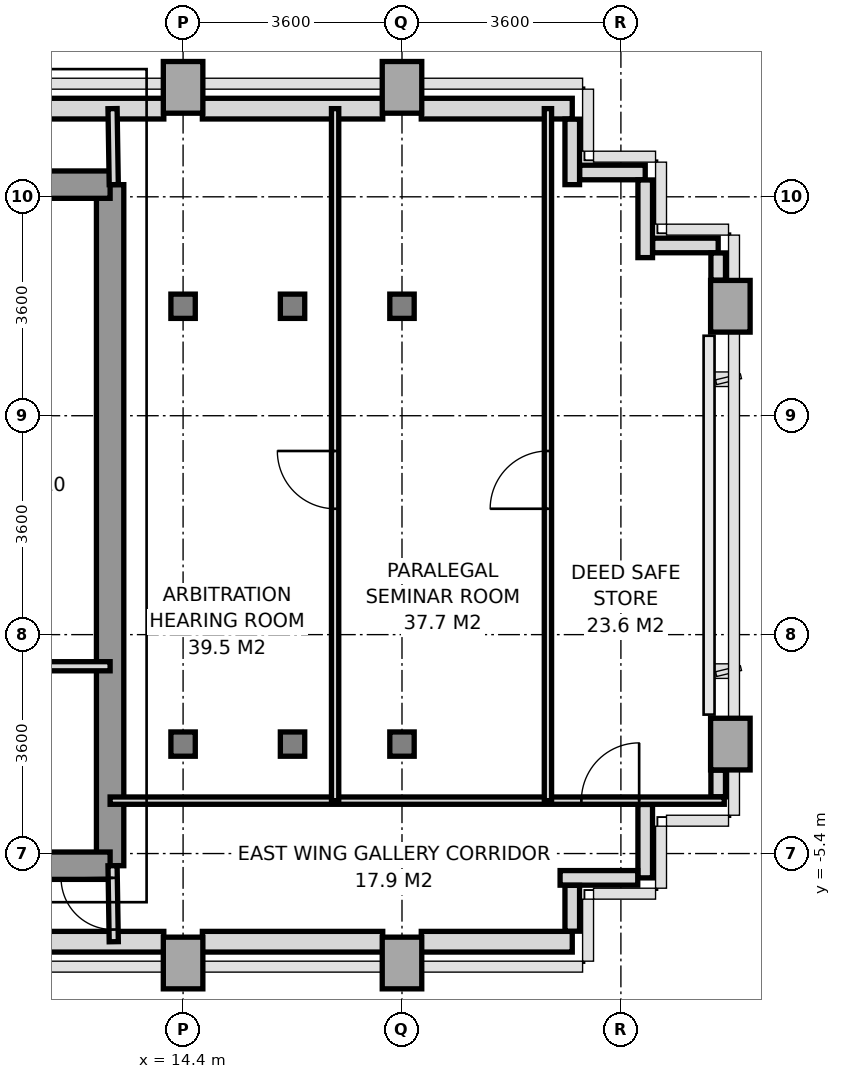
"""IFC4 building model, lengths in metres.
Left out: names, types, materials, properties, quantities, classifications, styles, units other than length and angle.
Written with IfcOpenShell. Run it as: python <this file> out.ifc"""

import sys

from ifc_helpers import new_model, si_unit, direction, frame, frame_2d, origin, origin_2d, place, context, subcontext, project, spatial, rectangle, i_section, extrude, source, transform, mapped, element, fill, save


model = new_model("IFC4")
c1 = context("Model", 3, precision=1e-05, world=origin(), true_north=direction((0.0, 1.0)))
c2 = subcontext(c1, "Body", "Model", "MODEL_VIEW")
j1 = project(units=[si_unit("LENGTHUNIT", "METRE"), si_unit("PLANEANGLEUNIT", "RADIAN")], contexts=[c1])
p1 = place(None, origin())
s1 = spatial("IfcSite", under=j1, at=p1, CompositionType="ELEMENT")
p2 = place(p1, origin())
s2 = spatial("IfcBuilding", under=s1, at=p2, CompositionType="ELEMENT")
p3 = place(p2, frame((0.0, 0.0, 127.8)))
s3 = spatial("IfcBuildingStorey", under=s2, at=p3, CompositionType="ELEMENT", Elevation=127.8)
m1 = source(origin(), c2, "Body", "SweptSolid", [
    extrude(rectangle(XDim=0.65, YDim=0.85, at=origin_2d()), origin(), (0.0, 0.0, 1.0), 3.2),
])
p4 = place(p3, frame((14.4, -7.2, 0.0), z_axis=(0.0, 0.0, 1.0), x_axis=(1.0, 0.0, 0.0)))
e1 = element("IfcColumn", 1, at=p4, inside=s3, PredefinedType="COLUMN", context=c2, shape_type="MappedRepresentation", body=[
    mapped(m1, transform((0.0, 0.0, 0.0), x_axis=(1.0, 0.0, 0.0), y_axis=(0.0, 1.0, 0.0), z_axis=(0.0, 0.0, 1.0), scale=1.0)),
])
m2 = source(origin(), c2, "Body", "SweptSolid", [
    extrude(i_section(OverallWidth=0.401, OverallDepth=0.399, WebThickness=0.02, FlangeThickness=0.032, at=origin_2d()), origin(), (0.0, 0.0, 1.0), 3.2),
])
for number, where, z_axis, x_axis in (
    (2, (14.4, -3.6, 0.0), (0.0, 0.0, 1.0), (1.0, 0.0, 0.0)),
    (3, (14.4, 3.6, 0.0), (0.0, 0.0, 1.0), (1.0, 0.0, 0.0)),
):
    element("IfcColumn", number, at=place(p3, frame(where, z_axis=z_axis, x_axis=x_axis)), inside=s3, PredefinedType="COLUMN", context=c2, shape_type="MappedRepresentation", body=[
        mapped(m2, transform((0.0, 0.0, 0.0), x_axis=(1.0, 0.0, 0.0), y_axis=(0.0, 1.0, 0.0), z_axis=(0.0, 0.0, 1.0), scale=1.0)),
    ])
p5 = place(p3, frame((14.4, 7.2, 0.0), z_axis=(0.0, 0.0, 1.0), x_axis=(1.0, 0.0, 0.0)))
e4 = element("IfcColumn", 4, at=p5, inside=s3, PredefinedType="COLUMN", context=c2, shape_type="MappedRepresentation", body=[
    mapped(m1, transform((0.0, 0.0, 0.0), x_axis=(1.0, 0.0, 0.0), y_axis=(0.0, 1.0, 0.0), z_axis=(0.0, 0.0, 1.0), scale=1.0)),
])
for number, where, z_axis, x_axis in (
    (5, (16.2, -3.6, 0.0), (0.0, 0.0, 1.0), (1.0, 0.0, 0.0)),
    (6, (16.2, 3.6, 0.0), (0.0, 0.0, 1.0), (1.0, 0.0, 0.0)),
):
    element("IfcColumn", number, at=place(p3, frame(where, z_axis=z_axis, x_axis=x_axis)), inside=s3, PredefinedType="COLUMN", context=c2, shape_type="MappedRepresentation", body=[
        mapped(m2, transform((0.0, 0.0, 0.0), x_axis=(1.0, 0.0, 0.0), y_axis=(0.0, 1.0, 0.0), z_axis=(0.0, 0.0, 1.0), scale=1.0)),
    ])
p6 = place(p3, frame((18.0, -7.2, 0.0), z_axis=(0.0, 0.0, 1.0), x_axis=(1.0, 0.0, 0.0)))
e7 = element("IfcColumn", 7, at=p6, inside=s3, PredefinedType="COLUMN", context=c2, shape_type="MappedRepresentation", body=[
    mapped(m1, transform((0.0, 0.0, 0.0), x_axis=(1.0, 0.0, 0.0), y_axis=(0.0, 1.0, 0.0), z_axis=(0.0, 0.0, 1.0), scale=1.0)),
])
for number, where, z_axis, x_axis in (
    (8, (18.0, -3.6, 0.0), (0.0, 0.0, 1.0), (1.0, 0.0, 0.0)),
    (9, (18.0, 3.6, 0.0), (0.0, 0.0, 1.0), (1.0, 0.0, 0.0)),
):
    element("IfcColumn", number, at=place(p3, frame(where, z_axis=z_axis, x_axis=x_axis)), inside=s3, PredefinedType="COLUMN", context=c2, shape_type="MappedRepresentation", body=[
        mapped(m2, transform((0.0, 0.0, 0.0), x_axis=(1.0, 0.0, 0.0), y_axis=(0.0, 1.0, 0.0), z_axis=(0.0, 0.0, 1.0), scale=1.0)),
    ])
for number, where, z_axis, x_axis in (
    (10, (18.0, 7.2, 0.0), (0.0, 0.0, 1.0), (1.0, 0.0, 0.0)),
    (11, (23.4, -3.6, 0.0), (0.0, 0.0, 1.0), (1.0, 0.0, 0.0)),
    (12, (23.4, 3.6, 0.0), (0.0, 0.0, 1.0), (1.0, 0.0, 0.0)),
):
    element("IfcColumn", number, at=place(p3, frame(where, z_axis=z_axis, x_axis=x_axis)), inside=s3, PredefinedType="COLUMN", context=c2, shape_type="MappedRepresentation", body=[
        mapped(m1, transform((0.0, 0.0, 0.0), x_axis=(1.0, 0.0, 0.0), y_axis=(0.0, 1.0, 0.0), z_axis=(0.0, 0.0, 1.0), scale=1.0)),
    ])
p7 = place(p3, frame((11.498, 6.85, 0.0), z_axis=(0.0, 0.0, 1.0), x_axis=(1.0, 0.0, 0.0)))
e13 = element("IfcWall", 13, at=p7, inside=s3, PredefinedType="SOLIDWALL", context=c2, shape_type="SweptSolid", body=[
    extrude(rectangle(XDim=2.585, YDim=0.34, at=frame_2d((1.292, 0.0))), origin(), (0.0, 0.0, 1.0), 3.2),
])
p8 = place(p3, frame((14.717, 6.85, 0.0), z_axis=(0.0, 0.0, 1.0), x_axis=(1.0, 0.0, 0.0)))
e14 = element("IfcWall", 14, at=p8, inside=s3, PredefinedType="SOLIDWALL", context=c2, shape_type="SweptSolid", body=[
    extrude(rectangle(XDim=2.966, YDim=0.34, at=frame_2d((1.483, 0.0))), origin(), (0.0, 0.0, 1.0), 2.45),
])
p9 = place(p3, frame((18.317, 6.85, 0.0), z_axis=(0.0, 0.0, 1.0), x_axis=(1.0, 0.0, 0.0)))
e15 = element("IfcWall", 15, at=p9, inside=s3, PredefinedType="SOLIDWALL", context=c2, shape_type="SweptSolid", body=[
    extrude(rectangle(XDim=2.483, YDim=0.34, at=frame_2d((1.242, 0.0))), origin(), (0.0, 0.0, 1.0), 3.2),
])
p10 = place(p3, frame((11.75, -6.85, 0.0), z_axis=(0.0, 0.0, 1.0), x_axis=(1.0, 0.0, 0.0)))
e16 = element("IfcWall", 16, at=p10, inside=s3, PredefinedType="SOLIDWALL", context=c2, shape_type="SweptSolid", body=[
    extrude(rectangle(XDim=2.333, YDim=0.34, at=frame_2d((1.167, 0.0))), origin(), (0.0, 0.0, 1.0), 3.2),
])
p11 = place(p3, frame((14.717, -6.85, 0.0), z_axis=(0.0, 0.0, 1.0), x_axis=(1.0, 0.0, 0.0)))
e17 = element("IfcWall", 17, at=p11, inside=s3, PredefinedType="SOLIDWALL", context=c2, shape_type="SweptSolid", body=[
    extrude(rectangle(XDim=2.966, YDim=0.34, at=frame_2d((1.483, 0.0))), origin(), (0.0, 0.0, 1.0), 2.45),
])
p12 = place(p3, frame((18.317, -6.85, 0.0), z_axis=(0.0, 0.0, 1.0), x_axis=(1.0, 0.0, 0.0)))
e18 = element("IfcWall", 18, at=p12, inside=s3, PredefinedType="SOLIDWALL", context=c2, shape_type="SweptSolid", body=[
    extrude(rectangle(XDim=2.483, YDim=0.34, at=frame_2d((1.242, 0.0))), origin(), (0.0, 0.0, 1.0), 3.2),
])
p13 = place(p3, frame((22.0, -4.593, 0.0), z_axis=(0.0, 0.0, 1.0), x_axis=(0.0, -1.0, 0.0)))
e19 = element("IfcWall", 19, at=p13, inside=s3, PredefinedType="PARAPET", context=c2, shape_type="SweptSolid", body=[
    extrude(rectangle(XDim=1.207, YDim=0.24, at=frame_2d((0.604, 0.0))), origin(), (0.0, 0.0, 1.0), 1.15),
])
p14 = place(p3, frame((21.877, -5.8, 0.0), z_axis=(0.0, 0.0, 1.0), x_axis=(-1.0, 0.0, 0.0)))
e20 = element("IfcWall", 20, at=p14, inside=s3, PredefinedType="PARAPET", context=c2, shape_type="SweptSolid", body=[
    extrude(rectangle(XDim=1.277, YDim=0.24, at=frame_2d((0.638, 0.0))), origin(), (0.0, 0.0, 1.0), 1.15),
])
p15 = place(p3, frame((20.8, -5.923, 0.0), z_axis=(0.0, 0.0, 1.0), x_axis=(0.0, -1.0, 0.0)))
e21 = element("IfcWall", 21, at=p15, inside=s3, PredefinedType="PARAPET", context=c2, shape_type="SweptSolid", body=[
    extrude(rectangle(XDim=0.754, YDim=0.24, at=frame_2d((0.377, 0.0))), origin(), (0.0, 0.0, 1.0), 1.15),
])
for number, where, z_axis, x_axis in (
    (22, (20.8, 6.677, 0.0), (0.0, 0.0, 1.0), (0.0, -1.0, 0.0)),
    (23, (20.923, 5.8, 0.0), (0.0, 0.0, 1.0), (1.0, 0.0, 0.0)),
):
    element("IfcWall", number, at=place(p3, frame(where, z_axis=z_axis, x_axis=x_axis)), inside=s3, PredefinedType="PARAPET", context=c2, shape_type="SweptSolid", body=[
        extrude(rectangle(XDim=1.077, YDim=0.24, at=frame_2d((0.539, 0.0))), origin(), (0.0, 0.0, 1.0), 1.15),
    ])
p16 = place(p3, frame((22.0, 5.677, 0.0), z_axis=(0.0, 0.0, 1.0), x_axis=(0.0, -1.0, 0.0)))
e24 = element("IfcWall", 24, at=p16, inside=s3, PredefinedType="PARAPET", context=c2, shape_type="SweptSolid", body=[
    extrude(rectangle(XDim=1.277, YDim=0.24, at=frame_2d((0.639, 0.0))), origin(), (0.0, 0.0, 1.0), 1.15),
])
p17 = place(p3, frame((22.123, 4.6, 0.0), z_axis=(0.0, 0.0, 1.0), x_axis=(1.0, 0.0, 0.0)))
e25 = element("IfcWall", 25, at=p17, inside=s3, PredefinedType="PARAPET", context=c2, shape_type="SweptSolid", body=[
    extrude(rectangle(XDim=1.077, YDim=0.24, at=frame_2d((0.539, 0.0))), origin(), (0.0, 0.0, 1.0), 1.15),
])
p18 = place(p3, frame((23.2, 4.477, 0.0), z_axis=(0.0, 0.0, 1.0), x_axis=(0.0, -1.0, 0.0)))
e26 = element("IfcWall", 26, at=p18, inside=s3, PredefinedType="PARAPET", context=c2, shape_type="SweptSolid", body=[
    extrude(rectangle(XDim=0.449, YDim=0.24, at=frame_2d((0.225, 0.0))), origin(), (0.0, 0.0, 1.0), 1.15),
])
p19 = place(p3, frame((23.2, -4.028, 0.0), z_axis=(0.0, 0.0, 1.0), x_axis=(0.0, -1.0, 0.0)))
e27 = element("IfcWall", 27, at=p19, inside=s3, PredefinedType="PARAPET", context=c2, shape_type="SweptSolid", body=[
    extrude(rectangle(XDim=0.439, YDim=0.24, at=frame_2d((0.219, 0.0))), origin(), (0.0, 0.0, 1.0), 1.15),
])
p20 = place(p3, frame((13.2, -5.6, 0.0), z_axis=(0.0, 0.0, 1.0), x_axis=(0.0, 1.0, 0.0)))
e28 = element("IfcWall", 28, at=p20, inside=s3, PredefinedType="SHEAR", context=c2, shape_type="SweptSolid", body=[
    extrude(rectangle(XDim=11.2, YDim=0.45, at=frame_2d((5.6, 0.0))), origin(), (0.0, 0.0, 1.0), 3.2),
])
p21 = place(p3, frame((11.381, 5.6, 0.0), z_axis=(0.0, 0.0, 1.0), x_axis=(1.0, 0.0, 0.0)))
e29 = element("IfcWall", 29, at=p21, inside=s3, PredefinedType="SHEAR", context=c2, shape_type="SweptSolid", body=[
    extrude(rectangle(XDim=1.819, YDim=0.45, at=frame_2d((0.909, 0.0))), origin(), (0.0, 0.0, 1.0), 3.2),
])
p22 = place(p3, frame((5.4, -5.6, 0.0), z_axis=(0.0, 0.0, 1.0), x_axis=(1.0, 0.0, 0.0)))
e30 = element("IfcWall", 30, at=p22, inside=s3, PredefinedType="SHEAR", context=c2, shape_type="SweptSolid", body=[
    extrude(rectangle(XDim=7.8, YDim=0.45, at=frame_2d((3.9, 0.0))), origin(), (0.0, 0.0, 1.0), 3.2),
])
p23 = place(p22, frame((3.0, 0.0, 0.0)))
e31 = element("IfcOpeningElement", 31, at=p23, cuts=e30, PredefinedType="OPENING", context=c2, shape_type="SweptSolid", body=[
    extrude(rectangle(XDim=1.2, YDim=2.2, at=frame_2d((0.6, 1.1))), frame((0.0, 0.235, 0.0), z_axis=(0.0, -1.0, 0.0), x_axis=(1.0, 0.0, 0.0)), (0.0, 0.0, 1.0), 0.47),
])
p24 = place(p22, frame((5.85, 0.0, 0.0)))
e32 = element("IfcOpeningElement", 32, at=p24, cuts=e30, PredefinedType="OPENING", context=c2, shape_type="SweptSolid", body=[
    extrude(rectangle(XDim=0.8, YDim=2.1, at=frame_2d((0.4, 1.05))), frame((0.0, 0.235, 0.0), z_axis=(0.0, -1.0, 0.0), x_axis=(1.0, 0.0, 0.0)), (0.0, 0.0, 1.0), 0.47),
])
p25 = place(p3, frame((11.02, -2.32, 0.0), z_axis=(0.0, 0.0, 1.0), x_axis=(1.0, 0.0, 0.0)))
e33 = element("IfcWall", 33, at=p25, inside=s3, PredefinedType="PARTITIONING", context=c2, shape_type="SweptSolid", body=[
    extrude(rectangle(XDim=2.18, YDim=0.15, at=frame_2d((1.09, 0.0))), origin(), (0.0, 0.0, 1.0), 3.2),
])
p26 = place(p3, frame((13.26, 5.6, 0.0), z_axis=(0.0, 0.0, 1.0), x_axis=(-0.016013571389, 0.999871774545, 0.0)))
e34 = element("IfcWall", 34, at=p26, inside=s3, PredefinedType="PARTITIONING", context=c2, shape_type="SweptSolid", body=[
    extrude(rectangle(XDim=1.25, YDim=0.15, at=frame_2d((0.625, 0.0))), origin(), (0.0, 0.0, 1.0), 3.2),
])
p27 = place(p3, frame((13.26, -6.85, 0.0), z_axis=(0.0, 0.0, 1.0), x_axis=(-0.016013571389, 0.999871774545, 0.0)))
e35 = element("IfcWall", 35, at=p27, inside=s3, PredefinedType="PARTITIONING", context=c2, shape_type="SweptSolid", body=[
    extrude(rectangle(XDim=1.25, YDim=0.15, at=frame_2d((0.625, 0.0))), origin(), (0.0, 0.0, 1.0), 3.2),
])
p28 = place(p27, frame((0.2, 0.0, 0.0)))
e36 = element("IfcOpeningElement", 36, at=p28, cuts=e35, PredefinedType="OPENING", context=c2, shape_type="SweptSolid", body=[
    extrude(rectangle(XDim=0.85, YDim=2.1, at=frame_2d((0.425, 1.05))), frame((0.0, 0.085, 0.0), z_axis=(0.0, -1.0, 0.0), x_axis=(1.0, 0.0, 0.0)), (0.0, 0.0, 1.0), 0.17),
])
p29 = place(p3, frame((13.2, -4.53, 0.0), z_axis=(0.0, 0.0, 1.0), x_axis=(1.0, 0.0, 0.0)))
e37 = element("IfcWall", 37, at=p29, inside=s3, PredefinedType="PARTITIONING", context=c2, shape_type="SweptSolid", body=[
    extrude(rectangle(XDim=10.1, YDim=0.12, at=frame_2d((5.05, 0.0))), origin(), (0.0, 0.0, 1.0), 2.75),
])
p30 = place(p29, frame((7.75, 0.0, 0.0)))
e38 = element("IfcOpeningElement", 38, at=p30, cuts=e37, PredefinedType="OPENING", context=c2, shape_type="SweptSolid", body=[
    extrude(rectangle(XDim=0.95, YDim=2.15, at=frame_2d((0.475, 1.075))), frame((0.0, 0.07, 0.0), z_axis=(0.0, -1.0, 0.0), x_axis=(1.0, 0.0, 0.0)), (0.0, 0.0, 1.0), 0.14),
])
p31 = place(p3, frame((16.9, -4.53, 0.0), z_axis=(0.0, 0.0, 1.0), x_axis=(0.0, 1.0, 0.0)))
e39 = element("IfcWall", 39, at=p31, inside=s3, PredefinedType="PARTITIONING", context=c2, shape_type="SweptSolid", body=[
    extrude(rectangle(XDim=11.38, YDim=0.12, at=frame_2d((5.69, 0.0))), origin(), (0.0, 0.0, 1.0), 2.7),
])
p32 = place(p31, frame((4.8, 0.0, 0.0)))
e40 = element("IfcOpeningElement", 40, at=p32, cuts=e39, PredefinedType="OPENING", context=c2, shape_type="SweptSolid", body=[
    extrude(rectangle(XDim=0.95, YDim=2.15, at=frame_2d((0.475, 1.075))), frame((0.0, 0.07, 0.0), z_axis=(0.0, -1.0, 0.0), x_axis=(1.0, 0.0, 0.0)), (0.0, 0.0, 1.0), 0.14),
])
p33 = place(p3, frame((20.4, -4.53, 0.0), z_axis=(0.0, 0.0, 1.0), x_axis=(0.0, 1.0, 0.0)))
e41 = element("IfcWall", 41, at=p33, inside=s3, PredefinedType="PARTITIONING", context=c2, shape_type="SweptSolid", body=[
    extrude(rectangle(XDim=11.38, YDim=0.12, at=frame_2d((5.69, 0.0))), origin(), (0.0, 0.0, 1.0), 2.7),
])
p34 = place(p33, frame((4.8, 0.0, 0.0)))
e42 = element("IfcOpeningElement", 42, at=p34, cuts=e41, PredefinedType="OPENING", context=c2, shape_type="SweptSolid", body=[
    extrude(rectangle(XDim=0.95, YDim=2.15, at=frame_2d((0.475, 1.075))), frame((0.0, 0.07, 0.0), z_axis=(0.0, -1.0, 0.0), x_axis=(1.0, 0.0, 0.0)), (0.0, 0.0, 1.0), 0.14),
])
m3 = source(origin(), c2, "Body", "SweptSolid", [
    extrude(rectangle(XDim=0.85, YDim=2.1, at=frame_2d((0.425, 1.05))), frame((0.0, 0.025, 0.0), z_axis=(0.0, -1.0, 0.0), x_axis=(1.0, 0.0, 0.0)), (0.0, 0.0, 1.0), 0.05),
])
p35 = place(p28, origin())
e43 = element("IfcDoor", 43, at=p35, inside=s3, OperationType="SINGLE_SWING_RIGHT", PredefinedType="DOOR", context=c2, shape_type="MappedRepresentation", body=[
    mapped(m3, transform((0.0, 0.0, 0.0), x_axis=(1.0, 0.0, 0.0), y_axis=(0.0, 1.0, 0.0), z_axis=(0.0, 0.0, 1.0), scale=1.0)),
])
fill(e36, e43)
m4 = source(origin(), c2, "Body", "SweptSolid", [
    extrude(rectangle(XDim=0.95, YDim=2.15, at=frame_2d((0.475, 1.075))), frame((0.0, 0.025, 0.0), z_axis=(0.0, -1.0, 0.0), x_axis=(1.0, 0.0, 0.0)), (0.0, 0.0, 1.0), 0.05),
])
p36 = place(p32, origin())
e44 = element("IfcDoor", 44, at=p36, inside=s3, OperationType="SINGLE_SWING_RIGHT", PredefinedType="DOOR", context=c2, shape_type="MappedRepresentation", body=[
    mapped(m4, transform((0.0, 0.0, 0.0), x_axis=(1.0, 0.0, 0.0), y_axis=(0.0, 1.0, 0.0), z_axis=(0.0, 0.0, 1.0), scale=1.0)),
])
fill(e40, e44)
p37 = place(p34, origin())
e45 = element("IfcDoor", 45, at=p37, inside=s3, OperationType="SINGLE_SWING_LEFT", PredefinedType="DOOR", context=c2, shape_type="MappedRepresentation", body=[
    mapped(m4, transform((0.0, 0.0, 0.0), x_axis=(1.0, 0.0, 0.0), y_axis=(0.0, 1.0, 0.0), z_axis=(0.0, 0.0, 1.0), scale=1.0)),
])
fill(e42, e45)
p38 = place(p30, origin())
e46 = element("IfcDoor", 46, at=p38, inside=s3, OperationType="SINGLE_SWING_RIGHT", PredefinedType="DOOR", context=c2, shape_type="MappedRepresentation", body=[
    mapped(m4, transform((0.0, 0.0, 0.0), x_axis=(1.0, 0.0, 0.0), y_axis=(0.0, 1.0, 0.0), z_axis=(0.0, 0.0, 1.0), scale=1.0)),
])
fill(e38, e46)
save(model, sys.argv[1])
